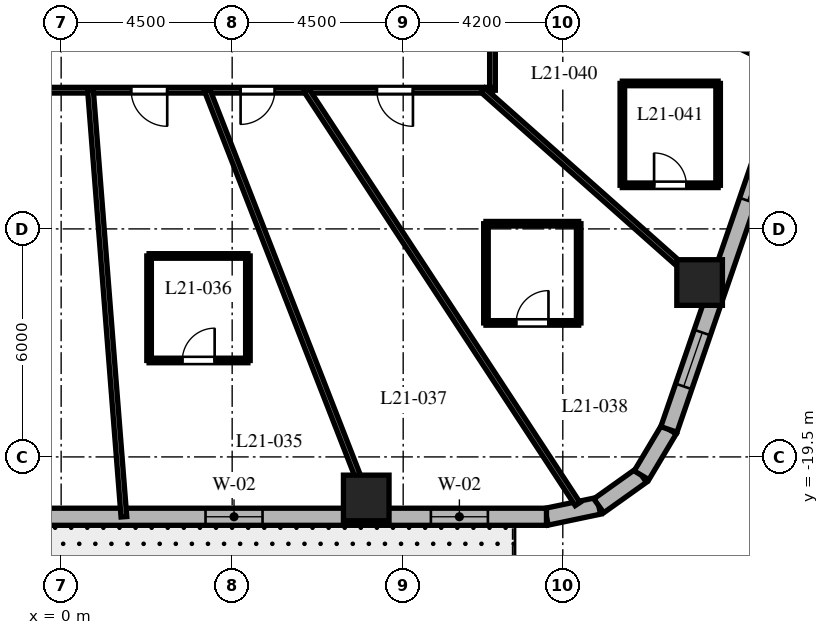
"""IFC4 building model, lengths in metres.
Left out: names, types, materials, properties, quantities, classifications, styles, units other than length and angle.
Written with IfcOpenShell. Run it as: python <this file> out.ifc"""

import sys

from ifc_helpers import new_model, si_unit, direction, frame, frame_2d, origin, origin_2d, place, context, subcontext, project, spatial, rectangle, extrude, element, fill, save


model = new_model("IFC4")
c1 = context("Model", 3, precision=1e-05, world=origin(), true_north=direction((0.0, 1.0)))
c2 = subcontext(c1, "Body", "Model", "MODEL_VIEW")
j1 = project(units=[si_unit("LENGTHUNIT", "METRE"), si_unit("PLANEANGLEUNIT", "RADIAN")], contexts=[c1])
p1 = place(None, origin())
s1 = spatial("IfcSite", under=j1, at=p1, CompositionType="ELEMENT")
p2 = place(p1, origin())
s2 = spatial("IfcBuilding", under=s1, at=p2, CompositionType="ELEMENT")
p3 = place(p2, frame((0.0, 0.0, 91.4)))
s3 = spatial("IfcBuildingStorey", under=s2, at=p3, CompositionType="ELEMENT", Elevation=91.4)
for number, where, z_axis, x_axis in (
    (1, (8.028, -20.58, 0.0), (0.0, 0.0, 1.0), (1.0, 0.0, 0.0)),
    (2, (16.8, -14.911, 0.0), (0.0, 0.0, 1.0), (1.0, 0.0, 0.0)),
):
    element("IfcColumn", number, at=place(p3, frame(where, z_axis=z_axis, x_axis=x_axis)), inside=s3, PredefinedType="COLUMN", context=c2, shape_type="SweptSolid", body=[
        extrude(rectangle(XDim=1.2, YDim=1.2, at=origin_2d()), origin(), (0.0, 0.0, 1.0), 3.7),
    ])
p4 = place(p3, frame((12.771, -21.075, 0.0), z_axis=(0.0, 0.0, 1.0), x_axis=(0.97874281988, 0.205091424819, 0.0)))
e3 = element("IfcWall", 3, at=p4, inside=s3, PredefinedType="SOLIDWALL", context=c2, shape_type="SweptSolid", body=[
    extrude(rectangle(XDim=1.406, YDim=0.45, at=frame_2d((0.703, 0.0))), origin(), (0.0, 0.0, 1.0), 3.4),
])
p5 = place(p3, frame((14.146, -20.787, 0.0), z_axis=(0.0, 0.0, 1.0), x_axis=(0.814162929117, 0.580636482536, 0.0)))
e4 = element("IfcWall", 4, at=p5, inside=s3, PredefinedType="SOLIDWALL", context=c2, shape_type="SweptSolid", body=[
    extrude(rectangle(XDim=1.382, YDim=0.45, at=frame_2d((0.691, 0.0))), origin(), (0.0, 0.0, 1.0), 3.4),
])
p6 = place(p3, frame((15.272, -19.984, 0.0), z_axis=(0.0, 0.0, 1.0), x_axis=(0.512579347361, 0.858639862025, 0.0)))
e5 = element("IfcWall", 5, at=p6, inside=s3, PredefinedType="SOLIDWALL", context=c2, shape_type="SweptSolid", body=[
    extrude(rectangle(XDim=1.406, YDim=0.45, at=frame_2d((0.703, 0.0))), origin(), (0.0, 0.0, 1.0), 3.4),
])
p7 = place(p3, frame((-11.012, -21.075, 0.0), z_axis=(0.0, 0.0, 1.0), x_axis=(1.0, 0.0, 0.0)))
e6 = element("IfcWall", 6, at=p7, inside=s3, PredefinedType="SOLIDWALL", context=c2, shape_type="SweptSolid", body=[
    extrude(rectangle(XDim=23.782, YDim=0.45, at=frame_2d((11.891, 0.0))), origin(), (0.0, 0.0, 1.0), 3.4),
])
p8 = place(p7, frame((2.473, 0.0, 0.0)))
e7 = element("IfcOpeningElement", 7, at=p8, cuts=e6, PredefinedType="OPENING", context=c2, shape_type="SweptSolid", body=[
    extrude(rectangle(XDim=1.0, YDim=2.15, at=frame_2d((0.5, 1.075))), frame((0.0, 0.235, 0.0), z_axis=(0.0, -1.0, 0.0), x_axis=(1.0, 0.0, 0.0)), (0.0, 0.0, 1.0), 0.47),
])
p9 = place(p7, frame((8.244, 0.0, 0.8)))
e8 = element("IfcOpeningElement", 8, at=p9, cuts=e6, PredefinedType="OPENING", context=c2, shape_type="SweptSolid", body=[
    extrude(rectangle(XDim=1.5, YDim=1.8, at=frame_2d((0.75, 0.9))), frame((0.0, 0.235, 0.0), z_axis=(0.0, -1.0, 0.0), x_axis=(1.0, 0.0, 0.0)), (0.0, 0.0, 1.0), 0.47),
])
p10 = place(p7, frame((14.811, 0.0, 0.8)))
e9 = element("IfcOpeningElement", 9, at=p10, cuts=e6, PredefinedType="OPENING", context=c2, shape_type="SweptSolid", body=[
    extrude(rectangle(XDim=1.5, YDim=1.8, at=frame_2d((0.75, 0.9))), frame((0.0, 0.235, 0.0), z_axis=(0.0, -1.0, 0.0), x_axis=(1.0, 0.0, 0.0)), (0.0, 0.0, 1.0), 0.47),
])
p11 = place(p7, frame((20.741, 0.0, 0.8)))
e10 = element("IfcOpeningElement", 10, at=p11, cuts=e6, PredefinedType="OPENING", context=c2, shape_type="SweptSolid", body=[
    extrude(rectangle(XDim=1.5, YDim=1.8, at=frame_2d((0.75, 0.9))), frame((0.0, 0.235, 0.0), z_axis=(0.0, -1.0, 0.0), x_axis=(1.0, 0.0, 0.0)), (0.0, 0.0, 1.0), 0.47),
])
p12 = place(p3, frame((15.992, -18.777, 0.0), z_axis=(0.0, 0.0, 1.0), x_axis=(0.325606988926, 0.945505202927, 0.0)))
e11 = element("IfcWall", 11, at=p12, inside=s3, PredefinedType="SOLIDWALL", context=c2, shape_type="SweptSolid", body=[
    extrude(rectangle(XDim=19.669, YDim=0.45, at=frame_2d((9.835, 0.0))), origin(), (0.0, 0.0, 1.0), 3.4),
])
p13 = place(p12, frame((1.197, 0.0, 0.8)))
e12 = element("IfcOpeningElement", 12, at=p13, cuts=e11, PredefinedType="OPENING", context=c2, shape_type="SweptSolid", body=[
    extrude(rectangle(XDim=1.5, YDim=1.8, at=frame_2d((0.75, 0.9))), frame((0.0, 0.235, 0.0), z_axis=(0.0, -1.0, 0.0), x_axis=(1.0, 0.0, 0.0)), (0.0, 0.0, 1.0), 0.47),
])
p14 = place(p12, frame((6.368, 0.0, 0.8)))
e13 = element("IfcOpeningElement", 13, at=p14, cuts=e11, PredefinedType="OPENING", context=c2, shape_type="SweptSolid", body=[
    extrude(rectangle(XDim=1.5, YDim=1.8, at=frame_2d((0.75, 0.9))), frame((0.0, 0.235, 0.0), z_axis=(0.0, -1.0, 0.0), x_axis=(1.0, 0.0, 0.0)), (0.0, 0.0, 1.0), 0.47),
])
p15 = place(p12, frame((11.885, 0.0, 0.8)))
e14 = element("IfcOpeningElement", 14, at=p15, cuts=e11, PredefinedType="OPENING", context=c2, shape_type="SweptSolid", body=[
    extrude(rectangle(XDim=1.5, YDim=1.8, at=frame_2d((0.75, 0.9))), frame((0.0, 0.235, 0.0), z_axis=(0.0, -1.0, 0.0), x_axis=(1.0, 0.0, 0.0)), (0.0, 0.0, 1.0), 0.47),
])
p16 = place(p12, frame((16.918, 0.0, 0.8)))
e15 = element("IfcOpeningElement", 15, at=p16, cuts=e11, PredefinedType="OPENING", context=c2, shape_type="SweptSolid", body=[
    extrude(rectangle(XDim=1.5, YDim=1.8, at=frame_2d((0.75, 0.9))), frame((0.0, 0.235, 0.0), z_axis=(0.0, -1.0, 0.0), x_axis=(1.0, 0.0, 0.0)), (0.0, 0.0, 1.0), 0.47),
])
p17 = place(p3, frame((11.35, 9.85, 0.0), z_axis=(0.0, 0.0, 1.0), x_axis=(0.0, -1.0, 0.0)))
e16 = element("IfcWall", 16, at=p17, inside=s3, PredefinedType="PARTITIONING", context=c2, shape_type="SweptSolid", body=[
    extrude(rectangle(XDim=19.7, YDim=0.15, at=frame_2d((9.85, 0.0))), origin(), (0.0, 0.0, 1.0), 2.84),
])
p18 = place(p17, frame((7.426, 0.0, 0.0)))
e17 = element("IfcOpeningElement", 17, at=p18, cuts=e16, PredefinedType="OPENING", context=c2, shape_type="SweptSolid", body=[
    extrude(rectangle(XDim=0.9, YDim=2.03, at=frame_2d((0.45, 1.015))), frame((0.0, 0.085, 0.0), z_axis=(0.0, -1.0, 0.0), x_axis=(1.0, 0.0, 0.0)), (0.0, 0.0, 1.0), 0.17),
])
p19 = place(p17, frame((3.008, 0.0, 0.0)))
e18 = element("IfcOpeningElement", 18, at=p19, cuts=e16, PredefinedType="OPENING", context=c2, shape_type="SweptSolid", body=[
    extrude(rectangle(XDim=0.95, YDim=2.03, at=frame_2d((0.475, 1.015))), frame((0.0, 0.085, 0.0), z_axis=(0.0, -1.0, 0.0), x_axis=(1.0, 0.0, 0.0)), (0.0, 0.0, 1.0), 0.17),
])
p20 = place(p17, frame((16.938, 0.0, 0.0)))
e19 = element("IfcOpeningElement", 19, at=p20, cuts=e16, PredefinedType="OPENING", context=c2, shape_type="SweptSolid", body=[
    extrude(rectangle(XDim=0.95, YDim=2.03, at=frame_2d((0.475, 1.015))), frame((0.0, 0.085, 0.0), z_axis=(0.0, -1.0, 0.0), x_axis=(1.0, 0.0, 0.0)), (0.0, 0.0, 1.0), 0.17),
])
p21 = place(p17, frame((13.171, 0.0, 0.0)))
e20 = element("IfcOpeningElement", 20, at=p21, cuts=e16, PredefinedType="OPENING", context=c2, shape_type="SweptSolid", body=[
    extrude(rectangle(XDim=0.95, YDim=2.03, at=frame_2d((0.475, 1.015))), frame((0.0, 0.085, 0.0), z_axis=(0.0, -1.0, 0.0), x_axis=(1.0, 0.0, 0.0)), (0.0, 0.0, 1.0), 0.17),
])
p22 = place(p17, frame((9.994, 0.0, 0.0)))
e21 = element("IfcOpeningElement", 21, at=p22, cuts=e16, PredefinedType="OPENING", context=c2, shape_type="SweptSolid", body=[
    extrude(rectangle(XDim=0.95, YDim=2.03, at=frame_2d((0.475, 1.015))), frame((0.0, 0.085, 0.0), z_axis=(0.0, -1.0, 0.0), x_axis=(1.0, 0.0, 0.0)), (0.0, 0.0, 1.0), 0.17),
])
p23 = place(p3, frame((11.35, -9.85, 0.0), z_axis=(0.0, 0.0, 1.0), x_axis=(-1.0, 0.0, 0.0)))
e22 = element("IfcWall", 22, at=p23, inside=s3, PredefinedType="PARTITIONING", context=c2, shape_type="SweptSolid", body=[
    extrude(rectangle(XDim=22.7, YDim=0.15, at=frame_2d((11.35, 0.0))), origin(), (0.0, 0.0, 1.0), 2.84),
])
p24 = place(p23, frame((17.237, 0.0, 0.0)))
e23 = element("IfcOpeningElement", 23, at=p24, cuts=e22, PredefinedType="OPENING", context=c2, shape_type="SweptSolid", body=[
    extrude(rectangle(XDim=0.95, YDim=2.03, at=frame_2d((0.475, 1.015))), frame((0.0, 0.085, 0.0), z_axis=(0.0, -1.0, 0.0), x_axis=(1.0, 0.0, 0.0)), (0.0, 0.0, 1.0), 0.17),
])
p25 = place(p23, frame((11.994, 0.0, 0.0)))
e24 = element("IfcOpeningElement", 24, at=p25, cuts=e22, PredefinedType="OPENING", context=c2, shape_type="SweptSolid", body=[
    extrude(rectangle(XDim=0.95, YDim=2.03, at=frame_2d((0.475, 1.015))), frame((0.0, 0.085, 0.0), z_axis=(0.0, -1.0, 0.0), x_axis=(1.0, 0.0, 0.0)), (0.0, 0.0, 1.0), 0.17),
])
p26 = place(p23, frame((8.559, 0.0, 0.0)))
e25 = element("IfcOpeningElement", 25, at=p26, cuts=e22, PredefinedType="OPENING", context=c2, shape_type="SweptSolid", body=[
    extrude(rectangle(XDim=0.95, YDim=2.03, at=frame_2d((0.475, 1.015))), frame((0.0, 0.085, 0.0), z_axis=(0.0, -1.0, 0.0), x_axis=(1.0, 0.0, 0.0)), (0.0, 0.0, 1.0), 0.17),
])
p27 = place(p23, frame((5.728, 0.0, 0.0)))
e26 = element("IfcOpeningElement", 26, at=p27, cuts=e22, PredefinedType="OPENING", context=c2, shape_type="SweptSolid", body=[
    extrude(rectangle(XDim=0.9, YDim=2.03, at=frame_2d((0.45, 1.015))), frame((0.0, 0.085, 0.0), z_axis=(0.0, -1.0, 0.0), x_axis=(1.0, 0.0, 0.0)), (0.0, 0.0, 1.0), 0.17),
])
p28 = place(p23, frame((2.093, 0.0, 0.0)))
e27 = element("IfcOpeningElement", 27, at=p28, cuts=e22, PredefinedType="OPENING", context=c2, shape_type="SweptSolid", body=[
    extrude(rectangle(XDim=0.95, YDim=2.03, at=frame_2d((0.475, 1.015))), frame((0.0, 0.085, 0.0), z_axis=(0.0, -1.0, 0.0), x_axis=(1.0, 0.0, 0.0)), (0.0, 0.0, 1.0), 0.17),
])
p29 = place(p3, frame((0.772, -9.85, 0.0), z_axis=(0.0, 0.0, 1.0), x_axis=(0.078125747145, -0.996943512759, 0.0)))
e28 = element("IfcWall", 28, at=p29, inside=s3, PredefinedType="PARTITIONING", context=c2, shape_type="SweptSolid", body=[
    extrude(rectangle(XDim=11.259, YDim=0.15, at=frame_2d((5.63, 0.0))), origin(), (0.0, 0.0, 1.0), 2.54),
])
p30 = place(p3, frame((3.842, -9.85, 0.0), z_axis=(0.0, 0.0, 1.0), x_axis=(0.363432685593, -0.931620460833, 0.0)))
e29 = element("IfcWall", 29, at=p30, inside=s3, PredefinedType="PARTITIONING", context=c2, shape_type="SweptSolid", body=[
    extrude(rectangle(XDim=12.049, YDim=0.15, at=frame_2d((6.024, 0.0))), origin(), (0.0, 0.0, 1.0), 2.54),
])
p31 = place(p3, frame((6.454, -9.85, 0.0), z_axis=(0.0, 0.0, 1.0), x_axis=(0.548052950111, -0.836443640584, 0.0)))
e30 = element("IfcWall", 30, at=p31, inside=s3, PredefinedType="PARTITIONING", context=c2, shape_type="SweptSolid", body=[
    extrude(rectangle(XDim=13.019, YDim=0.15, at=frame_2d((6.51, 0.0))), origin(), (0.0, 0.0, 1.0), 2.54),
])
p32 = place(p3, frame((11.098, -9.85, 0.0), z_axis=(0.0, 0.0, 1.0), x_axis=(0.747904295103, -0.663806572253, 0.0)))
e31 = element("IfcWall", 31, at=p32, inside=s3, PredefinedType="PARTITIONING", context=c2, shape_type="SweptSolid", body=[
    extrude(rectangle(XDim=8.16, YDim=0.15, at=frame_2d((4.08, 0.0))), origin(), (0.0, 0.0, 1.0), 2.54),
])
p33 = place(p3, frame((11.35, -5.515, 0.0), z_axis=(0.0, 0.0, 1.0), x_axis=(0.899424695618, -0.437075756492, 0.0)))
e32 = element("IfcWall", 32, at=p33, inside=s3, PredefinedType="PARTITIONING", context=c2, shape_type="SweptSolid", body=[
    extrude(rectangle(XDim=8.771, YDim=0.15, at=frame_2d((4.386, 0.0))), origin(), (0.0, 0.0, 1.0), 2.54),
])
p34 = place(p3, frame((2.314, -16.962, 0.0), z_axis=(0.0, 0.0, 1.0), x_axis=(1.0, 0.0, 0.0)))
e33 = element("IfcWall", 33, at=p34, inside=s3, PredefinedType="PARTITIONING", context=c2, shape_type="SweptSolid", body=[
    extrude(rectangle(XDim=2.6, YDim=0.12, at=frame_2d((1.3, 0.0))), origin(), (0.0, 0.0, 1.0), 3.4),
])
p35 = place(p34, frame((0.875, 0.0, 0.0)))
e34 = element("IfcOpeningElement", 34, at=p35, cuts=e33, PredefinedType="OPENING", context=c2, shape_type="SweptSolid", body=[
    extrude(rectangle(XDim=0.85, YDim=2.03, at=frame_2d((0.425, 1.015))), frame((0.0, 0.07, 0.0), z_axis=(0.0, -1.0, 0.0), x_axis=(1.0, 0.0, 0.0)), (0.0, 0.0, 1.0), 0.14),
])
p36 = place(p3, frame((4.914, -16.962, 0.0), z_axis=(0.0, 0.0, 1.0), x_axis=(0.0, 1.0, 0.0)))
e35 = element("IfcWall", 35, at=p36, inside=s3, PredefinedType="PARTITIONING", context=c2, shape_type="SweptSolid", body=[
    extrude(rectangle(XDim=2.75, YDim=0.12, at=frame_2d((1.375, 0.0))), origin(), (0.0, 0.0, 1.0), 2.841),
])
p37 = place(p3, frame((4.914, -14.212, 0.0), z_axis=(0.0, 0.0, 1.0), x_axis=(-1.0, 0.0, 0.0)))
e36 = element("IfcWall", 36, at=p37, inside=s3, PredefinedType="PARTITIONING", context=c2, shape_type="SweptSolid", body=[
    extrude(rectangle(XDim=2.6, YDim=0.12, at=frame_2d((1.3, 0.0))), origin(), (0.0, 0.0, 1.0), 3.4),
])
p38 = place(p3, frame((2.314, -14.212, 0.0), z_axis=(0.0, 0.0, 1.0), x_axis=(0.0, -1.0, 0.0)))
e37 = element("IfcWall", 37, at=p38, inside=s3, PredefinedType="PARTITIONING", context=c2, shape_type="SweptSolid", body=[
    extrude(rectangle(XDim=2.75, YDim=0.12, at=frame_2d((1.375, 0.0))), origin(), (0.0, 0.0, 1.0), 2.841),
])
p39 = place(p3, frame((11.178, -15.974, 0.0), z_axis=(0.0, 0.0, 1.0), x_axis=(1.0, 0.0, 0.0)))
e38 = element("IfcWall", 38, at=p39, inside=s3, PredefinedType="PARTITIONING", context=c2, shape_type="SweptSolid", body=[
    extrude(rectangle(XDim=2.44, YDim=0.12, at=frame_2d((1.22, 0.0))), origin(), (0.0, 0.0, 1.0), 3.4),
])
p40 = place(p39, frame((0.795, 0.0, 0.0)))
e39 = element("IfcOpeningElement", 39, at=p40, cuts=e38, PredefinedType="OPENING", context=c2, shape_type="SweptSolid", body=[
    extrude(rectangle(XDim=0.85, YDim=2.03, at=frame_2d((0.425, 1.015))), frame((0.0, 0.07, 0.0), z_axis=(0.0, -1.0, 0.0), x_axis=(1.0, 0.0, 0.0)), (0.0, 0.0, 1.0), 0.14),
])
p41 = place(p3, frame((13.618, -15.974, 0.0), z_axis=(0.0, 0.0, 1.0), x_axis=(0.0, 1.0, 0.0)))
e40 = element("IfcWall", 40, at=p41, inside=s3, PredefinedType="PARTITIONING", context=c2, shape_type="SweptSolid", body=[
    extrude(rectangle(XDim=2.61, YDim=0.12, at=frame_2d((1.305, 0.0))), origin(), (0.0, 0.0, 1.0), 3.4),
])
p42 = place(p3, frame((13.618, -13.364, 0.0), z_axis=(0.0, 0.0, 1.0), x_axis=(-1.0, 0.0, 0.0)))
e41 = element("IfcWall", 41, at=p42, inside=s3, PredefinedType="PARTITIONING", context=c2, shape_type="SweptSolid", body=[
    extrude(rectangle(XDim=2.44, YDim=0.12, at=frame_2d((1.22, 0.0))), origin(), (0.0, 0.0, 1.0), 2.927),
])
p43 = place(p3, frame((11.178, -13.364, 0.0), z_axis=(0.0, 0.0, 1.0), x_axis=(0.0, -1.0, 0.0)))
e42 = element("IfcWall", 42, at=p43, inside=s3, PredefinedType="PARTITIONING", context=c2, shape_type="SweptSolid", body=[
    extrude(rectangle(XDim=2.61, YDim=0.12, at=frame_2d((1.305, 0.0))), origin(), (0.0, 0.0, 1.0), 2.927),
])
p44 = place(p3, frame((14.767, -12.352, 0.0), z_axis=(0.0, 0.0, 1.0), x_axis=(1.0, 0.0, 0.0)))
e43 = element("IfcWall", 43, at=p44, inside=s3, PredefinedType="PARTITIONING", context=c2, shape_type="SweptSolid", body=[
    extrude(rectangle(XDim=2.52, YDim=0.12, at=frame_2d((1.26, 0.0))), origin(), (0.0, 0.0, 1.0), 3.4),
])
p45 = place(p44, frame((0.835, 0.0, 0.0)))
e44 = element("IfcOpeningElement", 44, at=p45, cuts=e43, PredefinedType="OPENING", context=c2, shape_type="SweptSolid", body=[
    extrude(rectangle(XDim=0.85, YDim=2.03, at=frame_2d((0.425, 1.015))), frame((0.0, 0.07, 0.0), z_axis=(0.0, -1.0, 0.0), x_axis=(1.0, 0.0, 0.0)), (0.0, 0.0, 1.0), 0.14),
])
p46 = place(p3, frame((17.287, -12.352, 0.0), z_axis=(0.0, 0.0, 1.0), x_axis=(0.0, 1.0, 0.0)))
e45 = element("IfcWall", 45, at=p46, inside=s3, PredefinedType="PARTITIONING", context=c2, shape_type="SweptSolid", body=[
    extrude(rectangle(XDim=2.68, YDim=0.12, at=frame_2d((1.34, 0.0))), origin(), (0.0, 0.0, 1.0), 3.4),
])
p47 = place(p3, frame((17.287, -9.672, 0.0), z_axis=(0.0, 0.0, 1.0), x_axis=(-1.0, 0.0, 0.0)))
e46 = element("IfcWall", 46, at=p47, inside=s3, PredefinedType="PARTITIONING", context=c2, shape_type="SweptSolid", body=[
    extrude(rectangle(XDim=2.52, YDim=0.12, at=frame_2d((1.26, 0.0))), origin(), (0.0, 0.0, 1.0), 2.972),
])
p48 = place(p3, frame((14.767, -9.672, 0.0), z_axis=(0.0, 0.0, 1.0), x_axis=(0.0, -1.0, 0.0)))
e47 = element("IfcWall", 47, at=p48, inside=s3, PredefinedType="PARTITIONING", context=c2, shape_type="SweptSolid", body=[
    extrude(rectangle(XDim=2.68, YDim=0.12, at=frame_2d((1.34, 0.0))), origin(), (0.0, 0.0, 1.0), 2.972),
])
p49 = place(p10, origin())
e48 = element("IfcWindow", 48, at=p49, inside=s3, PartitioningType="SINGLE_PANEL", PredefinedType="WINDOW", context=c2, shape_type="SweptSolid", body=[
    extrude(rectangle(XDim=1.5, YDim=1.8, at=frame_2d((0.75, 0.9))), frame((0.0, 0.03, 0.0), z_axis=(0.0, -1.0, 0.0), x_axis=(1.0, 0.0, 0.0)), (0.0, 0.0, 1.0), 0.06),
])
fill(e9, e48)
p50 = place(p11, origin())
e49 = element("IfcWindow", 49, at=p50, inside=s3, PartitioningType="SINGLE_PANEL", PredefinedType="WINDOW", context=c2, shape_type="SweptSolid", body=[
    extrude(rectangle(XDim=1.5, YDim=1.8, at=frame_2d((0.75, 0.9))), frame((0.0, 0.03, 0.0), z_axis=(0.0, -1.0, 0.0), x_axis=(1.0, 0.0, 0.0)), (0.0, 0.0, 1.0), 0.06),
])
fill(e10, e49)
p51 = place(p13, origin())
e50 = element("IfcWindow", 50, at=p51, inside=s3, PartitioningType="SINGLE_PANEL", PredefinedType="WINDOW", context=c2, shape_type="SweptSolid", body=[
    extrude(rectangle(XDim=1.5, YDim=1.8, at=frame_2d((0.75, 0.9))), frame((0.0, 0.03, 0.0), z_axis=(0.0, -1.0, 0.0), x_axis=(1.0, 0.0, 0.0)), (0.0, 0.0, 1.0), 0.06),
])
fill(e12, e50)
p52 = place(p14, origin())
e51 = element("IfcWindow", 51, at=p52, inside=s3, PartitioningType="SINGLE_PANEL", PredefinedType="WINDOW", context=c2, shape_type="SweptSolid", body=[
    extrude(rectangle(XDim=1.5, YDim=1.8, at=frame_2d((0.75, 0.9))), frame((0.0, 0.03, 0.0), z_axis=(0.0, -1.0, 0.0), x_axis=(1.0, 0.0, 0.0)), (0.0, 0.0, 1.0), 0.06),
])
fill(e13, e51)
p53 = place(p26, origin())
e52 = element("IfcDoor", 52, at=p53, inside=s3, OperationType="SINGLE_SWING_LEFT", PredefinedType="DOOR", context=c2, shape_type="SweptSolid", body=[
    extrude(rectangle(XDim=0.95, YDim=2.03, at=frame_2d((0.475, 1.015))), frame((0.0, 0.025, 0.0), z_axis=(0.0, -1.0, 0.0), x_axis=(1.0, 0.0, 0.0)), (0.0, 0.0, 1.0), 0.05),
])
fill(e25, e52)
p54 = place(p35, origin())
e53 = element("IfcDoor", 53, at=p54, inside=s3, OperationType="SINGLE_SWING_RIGHT", PredefinedType="DOOR", context=c2, shape_type="SweptSolid", body=[
    extrude(rectangle(XDim=0.85, YDim=2.03, at=frame_2d((0.425, 1.015))), frame((0.0, 0.025, 0.0), z_axis=(0.0, -1.0, 0.0), x_axis=(1.0, 0.0, 0.0)), (0.0, 0.0, 1.0), 0.05),
])
fill(e34, e53)
p55 = place(p27, origin())
e54 = element("IfcDoor", 54, at=p55, inside=s3, OperationType="SINGLE_SWING_RIGHT", PredefinedType="DOOR", context=c2, shape_type="SweptSolid", body=[
    extrude(rectangle(XDim=0.9, YDim=2.03, at=frame_2d((0.45, 1.015))), frame((0.0, 0.025, 0.0), z_axis=(0.0, -1.0, 0.0), x_axis=(1.0, 0.0, 0.0)), (0.0, 0.0, 1.0), 0.05),
])
fill(e26, e54)
p56 = place(p28, origin())
e55 = element("IfcDoor", 55, at=p56, inside=s3, OperationType="SINGLE_SWING_LEFT", PredefinedType="DOOR", context=c2, shape_type="SweptSolid", body=[
    extrude(rectangle(XDim=0.95, YDim=2.03, at=frame_2d((0.475, 1.015))), frame((0.0, 0.025, 0.0), z_axis=(0.0, -1.0, 0.0), x_axis=(1.0, 0.0, 0.0)), (0.0, 0.0, 1.0), 0.05),
])
fill(e27, e55)
p57 = place(p40, origin())
e56 = element("IfcDoor", 56, at=p57, inside=s3, OperationType="SINGLE_SWING_RIGHT", PredefinedType="DOOR", context=c2, shape_type="SweptSolid", body=[
    extrude(rectangle(XDim=0.85, YDim=2.03, at=frame_2d((0.425, 1.015))), frame((0.0, 0.025, 0.0), z_axis=(0.0, -1.0, 0.0), x_axis=(1.0, 0.0, 0.0)), (0.0, 0.0, 1.0), 0.05),
])
fill(e39, e56)
p58 = place(p45, origin())
e57 = element("IfcDoor", 57, at=p58, inside=s3, OperationType="SINGLE_SWING_LEFT", PredefinedType="DOOR", context=c2, shape_type="SweptSolid", body=[
    extrude(rectangle(XDim=0.85, YDim=2.03, at=frame_2d((0.425, 1.015))), frame((0.0, 0.025, 0.0), z_axis=(0.0, -1.0, 0.0), x_axis=(1.0, 0.0, 0.0)), (0.0, 0.0, 1.0), 0.05),
])
fill(e44, e57)
save(model, sys.argv[1])
